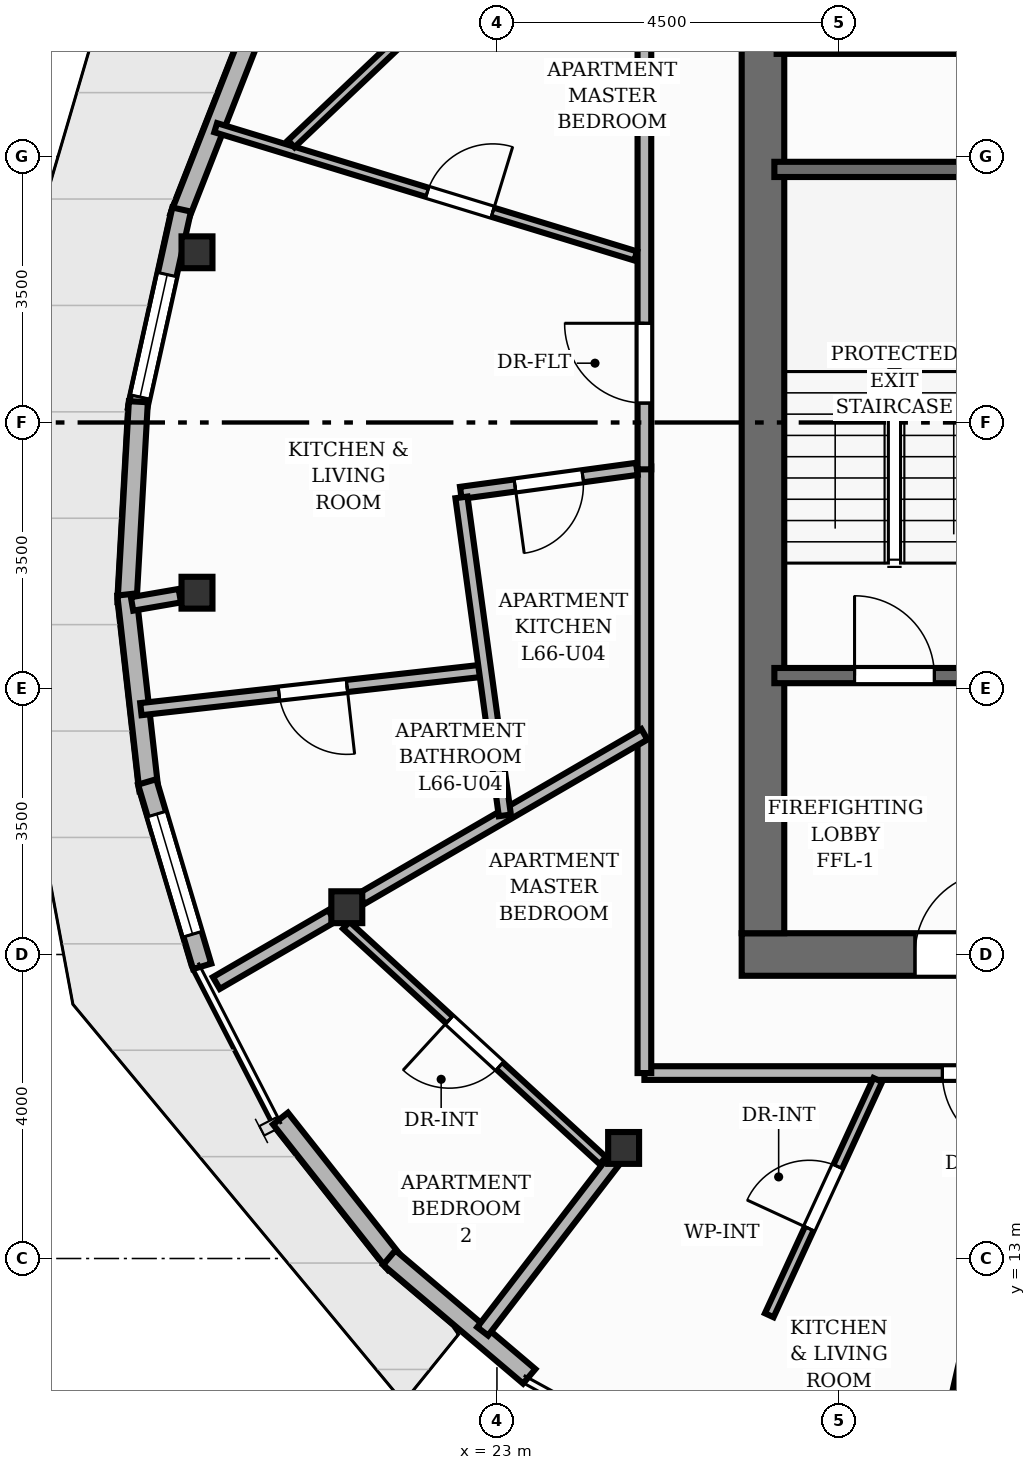
"""IFC4 building model, lengths in metres.
Left out: names, types, materials, properties, quantities, classifications, styles, units other than length and angle.
Written with IfcOpenShell. Run it as: python <this file> out.ifc"""

import sys

from ifc_helpers import new_model, si_unit, direction, frame, frame_2d, origin, origin_2d, place, context, subcontext, project, spatial, rectangle, i_section, extrude, element, fill, save


model = new_model("IFC4")
c1 = context("Model", 3, precision=1e-05, world=origin(), true_north=direction((0.0, 1.0)))
c2 = subcontext(c1, "Body", "Model", "MODEL_VIEW")
j1 = project(units=[si_unit("LENGTHUNIT", "METRE"), si_unit("PLANEANGLEUNIT", "RADIAN")], contexts=[c1])
p1 = place(None, origin())
s1 = spatial("IfcSite", under=j1, at=p1, CompositionType="ELEMENT")
p2 = place(p1, origin())
s2 = spatial("IfcBuilding", under=s1, at=p2, CompositionType="ELEMENT")
p3 = place(p2, frame((0.0, 0.0, 220.64)))
s3 = spatial("IfcBuildingStorey", under=s2, at=p3, CompositionType="ELEMENT", Elevation=220.64)
p4 = place(p3, frame((26.22, 17.0, 0.0), z_axis=(0.0, 0.0, 1.0), x_axis=(1.0, 0.0, 0.0)))
e1 = element("IfcWall", 1, at=p4, inside=s3, PredefinedType="SHEAR", context=c2, shape_type="SweptSolid", body=[
    extrude(rectangle(XDim=11.56, YDim=0.56, at=frame_2d((5.78, 0.0))), origin(), (0.0, 0.0, 1.0), 3.2),
])
p5 = place(p4, frame((2.28, 0.0, 0.0)))
e2 = element("IfcOpeningElement", 2, at=p5, cuts=e1, PredefinedType="OPENING", context=c2, shape_type="SweptSolid", body=[
    extrude(rectangle(XDim=1.1, YDim=2.15, at=frame_2d((0.55, 1.075))), frame((0.0, 0.29, 0.0), z_axis=(0.0, -1.0, 0.0), x_axis=(1.0, 0.0, 0.0)), (0.0, 0.0, 1.0), 0.58),
])
p6 = place(p4, frame((5.83, 0.0, 0.0)))
e3 = element("IfcOpeningElement", 3, at=p6, cuts=e1, PredefinedType="OPENING", context=c2, shape_type="SweptSolid", body=[
    extrude(rectangle(XDim=0.9, YDim=2.1, at=frame_2d((0.45, 1.05))), frame((0.0, 0.29, 0.0), z_axis=(0.0, -1.0, 0.0), x_axis=(1.0, 0.0, 0.0)), (0.0, 0.0, 1.0), 0.58),
])
p7 = place(p3, frame((26.5, 17.28, 0.0), z_axis=(0.0, 0.0, 1.0), x_axis=(0.0, 1.0, 0.0)))
e4 = element("IfcWall", 4, at=p7, inside=s3, PredefinedType="SHEAR", context=c2, shape_type="SweptSolid", body=[
    extrude(rectangle(XDim=13.44, YDim=0.56, at=frame_2d((6.72, 0.0))), origin(), (0.0, 0.0, 1.0), 3.2),
])
for number, where, z_axis, x_axis in (
    (5, (19.054, 26.24, 0.0), (0.0, 0.0, 1.0), (1.0, 0.0, 0.0)),
    (6, (19.054, 21.76, 0.0), (0.0, 0.0, 1.0), (1.0, 0.0, 0.0)),
    (7, (21.025, 17.622, 0.0), (0.0, 0.0, 1.0), (1.0, 0.0, 0.0)),
    (8, (24.667, 14.455, 0.0), (0.0, 0.0, 1.0), (1.0, 0.0, 0.0)),
):
    element("IfcColumn", number, at=place(p3, frame(where, z_axis=z_axis, x_axis=x_axis)), inside=s3, PredefinedType="COLUMN", context=c2, shape_type="SweptSolid", body=[
        extrude(i_section(OverallWidth=0.407, OverallDepth=0.419, WebThickness=0.031, FlangeThickness=0.049, at=origin_2d()), origin(), (0.0, 0.0, 1.0), 3.2),
    ])
p8 = place(p3, frame((18.82, 26.698, 0.0), z_axis=(0.0, 0.0, 1.0), x_axis=(0.365588934877, 0.930776412838, 0.0)))
e9 = element("IfcWall", 9, at=p8, inside=s3, PredefinedType="SOLIDWALL", context=c2, shape_type="SweptSolid", body=[
    extrude(rectangle(XDim=2.739, YDim=0.25, at=frame_2d((1.369, 0.0))), origin(), (0.0, 0.0, 1.0), 2.577),
])
p9 = place(p3, frame((18.267, 24.164, 0.0), z_axis=(0.0, 0.0, 1.0), x_axis=(0.21633718885, 0.976318708579, 0.0)))
e10 = element("IfcWall", 10, at=p9, inside=s3, PredefinedType="SOLIDWALL", context=c2, shape_type="SweptSolid", body=[
    extrude(rectangle(XDim=2.702, YDim=0.25, at=frame_2d((1.351, 0.0))), origin(), (0.0, 0.0, 1.0), 2.577),
])
p10 = place(p9, frame((0.175, 0.0, 0.85)))
e11 = element("IfcOpeningElement", 11, at=p10, cuts=e10, PredefinedType="OPENING", context=c2, shape_type="SweptSolid", body=[
    extrude(rectangle(XDim=1.65, YDim=1.55, at=frame_2d((0.825, 0.775))), frame((0.0, 0.135, 0.0), z_axis=(0.0, -1.0, 0.0), x_axis=(1.0, 0.0, 0.0)), (0.0, 0.0, 1.0), 0.27),
])
p11 = place(p3, frame((18.133, 21.626, 0.0), z_axis=(0.0, 0.0, 1.0), x_axis=(0.056270814174, 0.998415542483, 0.0)))
e12 = element("IfcWall", 12, at=p11, inside=s3, PredefinedType="SOLIDWALL", context=c2, shape_type="SweptSolid", body=[
    extrude(rectangle(XDim=2.651, YDim=0.25, at=frame_2d((1.325, 0.0))), origin(), (0.0, 0.0, 1.0), 2.96),
])
p12 = place(p3, frame((18.421, 19.161, 0.0), z_axis=(0.0, 0.0, 1.0), x_axis=(-0.112260931198, 0.993678762642, 0.0)))
e13 = element("IfcWall", 13, at=p12, inside=s3, PredefinedType="SOLIDWALL", context=c2, shape_type="SweptSolid", body=[
    extrude(rectangle(XDim=2.592, YDim=0.25, at=frame_2d((1.296, 0.0))), origin(), (0.0, 0.0, 1.0), 2.96),
])
p13 = place(p3, frame((19.122, 16.844, 0.0), z_axis=(0.0, 0.0, 1.0), x_axis=(-0.285604720301, 0.958347506775, 0.0)))
e14 = element("IfcWall", 14, at=p13, inside=s3, PredefinedType="SOLIDWALL", context=c2, shape_type="SweptSolid", body=[
    extrude(rectangle(XDim=2.532, YDim=0.25, at=frame_2d((1.266, 0.0))), origin(), (0.0, 0.0, 1.0), 2.96),
])
p14 = place(p13, frame((0.441, 0.0, 0.85)))
e15 = element("IfcOpeningElement", 15, at=p14, cuts=e14, PredefinedType="OPENING", context=c2, shape_type="SweptSolid", body=[
    extrude(rectangle(XDim=1.65, YDim=1.55, at=frame_2d((0.825, 0.775))), frame((0.0, 0.135, 0.0), z_axis=(0.0, -1.0, 0.0), x_axis=(1.0, 0.0, 0.0)), (0.0, 0.0, 1.0), 0.27),
])
p15 = place(p3, frame((21.663, 12.929, 0.0), z_axis=(0.0, 0.0, 1.0), x_axis=(-0.619881401672, 0.784695512833, 0.0)))
e16 = element("IfcWall", 16, at=p15, inside=s3, PredefinedType="SOLIDWALL", context=c2, shape_type="SweptSolid", body=[
    extrude(rectangle(XDim=2.437, YDim=0.25, at=frame_2d((1.218, 0.0))), origin(), (0.0, 0.0, 1.0), 2.96),
])
p16 = place(p3, frame((23.425, 11.45, 0.0), z_axis=(0.0, 0.0, 1.0), x_axis=(-0.762614923672, 0.646852748462, 0.0)))
e17 = element("IfcWall", 17, at=p16, inside=s3, PredefinedType="SOLIDWALL", context=c2, shape_type="SweptSolid", body=[
    extrude(rectangle(XDim=2.415, YDim=0.25, at=frame_2d((1.208, 0.0))), origin(), (0.0, 0.0, 1.0), 2.96),
])
p17 = place(p3, frame((26.65, 27.33, 0.0), z_axis=(0.0, 0.0, 1.0), x_axis=(1.0, 0.0, 0.0)))
e18 = element("IfcWall", 18, at=p17, inside=s3, PredefinedType="SHEAR", context=c2, shape_type="SweptSolid", body=[
    extrude(rectangle(XDim=3.24, YDim=0.2, at=frame_2d((1.62, 0.0))), origin(), (0.0, 0.0, 1.0), 3.2),
])
p18 = place(p3, frame((26.65, 20.67, 0.0), z_axis=(0.0, 0.0, 1.0), x_axis=(1.0, 0.0, 0.0)))
e19 = element("IfcWall", 19, at=p18, inside=s3, PredefinedType="SHEAR", context=c2, shape_type="SweptSolid", body=[
    extrude(rectangle(XDim=3.24, YDim=0.2, at=frame_2d((1.62, 0.0))), origin(), (0.0, 0.0, 1.0), 3.2),
])
p19 = place(p18, frame((1.055, 0.0, 0.0)))
e20 = element("IfcOpeningElement", 20, at=p19, cuts=e19, PredefinedType="OPENING", context=c2, shape_type="SweptSolid", body=[
    extrude(rectangle(XDim=1.05, YDim=2.15, at=frame_2d((0.525, 1.075))), frame((0.0, 0.11, 0.0), z_axis=(0.0, -1.0, 0.0), x_axis=(1.0, 0.0, 0.0)), (0.0, 0.0, 1.0), 0.22),
])
p20 = place(p3, frame((26.68, 28.95, 0.0), z_axis=(0.0, 0.0, 1.0), x_axis=(1.0, 0.0, 0.0)))
e21 = element("IfcWall", 21, at=p20, inside=s3, PredefinedType="SHEAR", context=c2, shape_type="SweptSolid", body=[
    extrude(rectangle(XDim=5.24, YDim=0.2, at=frame_2d((2.62, 0.0))), origin(), (0.0, 0.0, 1.0), 3.2),
])
p21 = place(p3, frame((18.827, 21.721, 0.0), z_axis=(0.0, 0.0, 1.0), x_axis=(-0.985371537423, -0.170419873359, 0.0)))
e22 = element("IfcWall", 22, at=p21, inside=s3, PredefinedType="PARTITIONING", context=c2, shape_type="SweptSolid", body=[
    extrude(rectangle(XDim=0.637, YDim=0.18, at=frame_2d((0.319, 0.0))), origin(), (0.0, 0.0, 1.0), 2.404),
])
p22 = place(p3, frame((20.826, 17.507, 0.0), z_axis=(0.0, 0.0, 1.0), x_axis=(-0.864599922959, -0.502460917106, 0.0)))
e23 = element("IfcWall", 23, at=p22, inside=s3, PredefinedType="PARTITIONING", context=c2, shape_type="SweptSolid", body=[
    extrude(rectangle(XDim=1.756, YDim=0.18, at=frame_2d((0.878, 0.0))), origin(), (0.0, 0.0, 1.0), 2.404),
])
p23 = place(p3, frame((24.527, 14.273, 0.0), z_axis=(0.0, 0.0, 1.0), x_axis=(-0.609232660573, -0.792991529142, 0.0)))
e24 = element("IfcWall", 24, at=p23, inside=s3, PredefinedType="PARTITIONING", context=c2, shape_type="SweptSolid", body=[
    extrude(rectangle(XDim=2.814, YDim=0.18, at=frame_2d((1.407, 0.0))), origin(), (0.0, 0.0, 1.0), 2.404),
])
p24 = place(p3, frame((29.374, 12.517, 0.0), z_axis=(0.0, 0.0, 1.0), x_axis=(-0.22291168124, -0.974838644272, 0.0)))
e25 = element("IfcWall", 25, at=p24, inside=s3, PredefinedType="PARTITIONING", context=c2, shape_type="SweptSolid", body=[
    extrude(rectangle(XDim=2.976, YDim=0.18, at=frame_2d((1.488, 0.0))), origin(), (0.0, 0.0, 1.0), 2.404),
])
p25 = place(p3, frame((30.74, 15.44, 0.0), z_axis=(0.0, 0.0, 1.0), x_axis=(-1.0, 0.0, 0.0)))
e26 = element("IfcWall", 26, at=p25, inside=s3, PredefinedType="PARTITIONING", context=c2, shape_type="SweptSolid", body=[
    extrude(rectangle(XDim=5.8, YDim=0.18, at=frame_2d((2.9, 0.0))), origin(), (0.0, 0.0, 1.0), 2.955),
])
p26 = place(p25, frame((0.83, 0.0, 0.0)))
e27 = element("IfcOpeningElement", 27, at=p26, cuts=e26, PredefinedType="OPENING", context=c2, shape_type="SweptSolid", body=[
    extrude(rectangle(XDim=1.05, YDim=2.15, at=frame_2d((0.525, 1.075))), frame((0.0, 0.1, 0.0), z_axis=(0.0, -1.0, 0.0), x_axis=(1.0, 0.0, 0.0)), (0.0, 0.0, 1.0), 0.2),
])
p27 = place(p3, frame((24.94, 15.44, 0.0), z_axis=(0.0, 0.0, 1.0), x_axis=(0.0, 1.0, 0.0)))
e28 = element("IfcWall", 28, at=p27, inside=s3, PredefinedType="PARTITIONING", context=c2, shape_type="SweptSolid", body=[
    extrude(rectangle(XDim=7.982, YDim=0.18, at=frame_2d((3.991, 0.0))), origin(), (0.0, 0.0, 1.0), 2.955),
])
p28 = place(p3, frame((24.94, 23.384, 0.0), z_axis=(0.0, 0.0, 1.0), x_axis=(0.0, 1.0, 0.0)))
e29 = element("IfcWall", 29, at=p28, inside=s3, PredefinedType="PARTITIONING", context=c2, shape_type="SweptSolid", body=[
    extrude(rectangle(XDim=9.177, YDim=0.18, at=frame_2d((4.588, 0.0))), origin(), (0.0, 0.0, 1.0), 2.955),
])
p29 = place(p28, frame((0.872, 0.0, 0.0)))
e30 = element("IfcOpeningElement", 30, at=p29, cuts=e29, PredefinedType="OPENING", context=c2, shape_type="SweptSolid", body=[
    extrude(rectangle(XDim=1.05, YDim=2.15, at=frame_2d((0.525, 1.075))), frame((0.0, 0.1, 0.0), z_axis=(0.0, -1.0, 0.0), x_axis=(1.0, 0.0, 0.0)), (0.0, 0.0, 1.0), 0.2),
])
p30 = place(p3, frame((26.583, 12.253, 0.0), z_axis=(0.0, 0.0, 1.0), x_axis=(0.41880384085, 0.908076727424, 0.0)))
e31 = element("IfcWall", 31, at=p30, inside=s3, PredefinedType="PARTITIONING", context=c2, shape_type="SweptSolid", body=[
    extrude(rectangle(XDim=3.409, YDim=0.125, at=frame_2d((1.705, 0.0))), origin(), (0.0, 0.0, 1.0), 2.955),
])
p31 = place(p30, frame((1.255, 0.0, 0.0)))
e32 = element("IfcOpeningElement", 32, at=p31, cuts=e31, PredefinedType="OPENING", context=c2, shape_type="SweptSolid", body=[
    extrude(rectangle(XDim=0.9, YDim=2.1, at=frame_2d((0.45, 1.05))), frame((0.0, 0.073, 0.0), z_axis=(0.0, -1.0, 0.0), x_axis=(1.0, 0.0, 0.0)), (0.0, 0.0, 1.0), 0.145),
])
p32 = place(p3, frame((24.393, 14.288, 0.0), z_axis=(0.0, 0.0, 1.0), x_axis=(-0.736828890574, 0.676079274949, 0.0)))
e33 = element("IfcWall", 33, at=p32, inside=s3, PredefinedType="PARTITIONING", context=c2, shape_type="SweptSolid", body=[
    extrude(rectangle(XDim=4.582, YDim=0.125, at=frame_2d((2.291, 0.0))), origin(), (0.0, 0.0, 1.0), 2.488),
])
p33 = place(p32, frame((1.841, 0.0, 0.0)))
e34 = element("IfcOpeningElement", 34, at=p33, cuts=e33, PredefinedType="OPENING", context=c2, shape_type="SweptSolid", body=[
    extrude(rectangle(XDim=0.9, YDim=2.1, at=frame_2d((0.45, 1.05))), frame((0.0, 0.073, 0.0), z_axis=(0.0, -1.0, 0.0), x_axis=(1.0, 0.0, 0.0)), (0.0, 0.0, 1.0), 0.145),
])
p34 = place(p3, frame((21.218, 17.734, 0.0), z_axis=(0.0, 0.0, 1.0), x_axis=(0.864618907014, 0.502428249239, 0.0)))
e35 = element("IfcWall", 35, at=p34, inside=s3, PredefinedType="PLUMBINGWALL", context=c2, shape_type="SweptSolid", body=[
    extrude(rectangle(XDim=4.305, YDim=0.16, at=frame_2d((2.153, 0.0))), origin(), (0.0, 0.0, 1.0), 2.404),
])
p35 = place(p3, frame((22.844, 20.738, 0.0), z_axis=(0.0, 0.0, 1.0), x_axis=(-0.993735184374, -0.111760383578, 0.0)))
e36 = element("IfcWall", 36, at=p35, inside=s3, PredefinedType="PLUMBINGWALL", context=c2, shape_type="SweptSolid", body=[
    extrude(rectangle(XDim=4.557, YDim=0.16, at=frame_2d((2.278, 0.0))), origin(), (0.0, 0.0, 1.0), 2.692),
])
p36 = place(p35, frame((1.829, 0.0, 0.0)))
e37 = element("IfcOpeningElement", 37, at=p36, cuts=e36, PredefinedType="OPENING", context=c2, shape_type="SweptSolid", body=[
    extrude(rectangle(XDim=0.9, YDim=2.1, at=frame_2d((0.45, 1.05))), frame((0.0, 0.09, 0.0), z_axis=(0.0, -1.0, 0.0), x_axis=(1.0, 0.0, 0.0)), (0.0, 0.0, 1.0), 0.18),
])
p37 = place(p3, frame((19.3, 27.879, 0.0), z_axis=(0.0, 0.0, 1.0), x_axis=(0.956379122361, -0.29212835246, 0.0)))
e38 = element("IfcWall", 38, at=p37, inside=s3, PredefinedType="PARTITIONING", context=c2, shape_type="SweptSolid", body=[
    extrude(rectangle(XDim=5.777, YDim=0.125, at=frame_2d((2.889, 0.0))), origin(), (0.0, 0.0, 1.0), 2.692),
])
p38 = place(p37, frame((2.91, 0.0, 0.0)))
e39 = element("IfcOpeningElement", 39, at=p38, cuts=e38, PredefinedType="OPENING", context=c2, shape_type="SweptSolid", body=[
    extrude(rectangle(XDim=0.9, YDim=2.1, at=frame_2d((0.45, 1.05))), frame((0.0, 0.073, 0.0), z_axis=(0.0, -1.0, 0.0), x_axis=(1.0, 0.0, 0.0)), (0.0, 0.0, 1.0), 0.145),
])
p39 = place(p3, frame((24.841, 23.39, 0.0), z_axis=(0.0, 0.0, 1.0), x_axis=(-0.990823810893, -0.135159815654, 0.0)))
e40 = element("IfcWall", 40, at=p39, inside=s3, PredefinedType="PLUMBINGWALL", context=c2, shape_type="SweptSolid", body=[
    extrude(rectangle(XDim=2.337, YDim=0.16, at=frame_2d((1.169, 0.0))), origin(), (0.0, 0.0, 1.0), 2.692),
])
p40 = place(p39, frame((0.719, 0.0, 0.0)))
e41 = element("IfcOpeningElement", 41, at=p40, cuts=e40, PredefinedType="OPENING", context=c2, shape_type="SweptSolid", body=[
    extrude(rectangle(XDim=0.9, YDim=2.1, at=frame_2d((0.45, 1.05))), frame((0.0, 0.09, 0.0), z_axis=(0.0, -1.0, 0.0), x_axis=(1.0, 0.0, 0.0)), (0.0, 0.0, 1.0), 0.18),
])
p41 = place(p3, frame((22.533, 23.015, 0.0), z_axis=(0.0, 0.0, 1.0), x_axis=(0.135218975067, -0.990815739066, 0.0)))
e42 = element("IfcWall", 42, at=p41, inside=s3, PredefinedType="PLUMBINGWALL", context=c2, shape_type="SweptSolid", body=[
    extrude(rectangle(XDim=4.223, YDim=0.16, at=frame_2d((2.112, 0.0))), origin(), (0.0, 0.0, 1.0), 2.955),
])
p42 = place(p3, frame((20.293, 27.667, 0.0), z_axis=(0.0, 0.0, 1.0), x_axis=(0.725799476315, 0.687906330965, 0.0)))
e43 = element("IfcWall", 43, at=p42, inside=s3, PredefinedType="PARTITIONING", context=c2, shape_type="SweptSolid", body=[
    extrude(rectangle(XDim=6.282, YDim=0.125, at=frame_2d((3.141, 0.0))), origin(), (0.0, 0.0, 1.0), 2.955),
])
p43 = place(p42, frame((2.691, 0.0, 0.0)))
e44 = element("IfcOpeningElement", 44, at=p43, cuts=e43, PredefinedType="OPENING", context=c2, shape_type="SweptSolid", body=[
    extrude(rectangle(XDim=0.9, YDim=2.1, at=frame_2d((0.45, 1.05))), frame((0.0, 0.073, 0.0), z_axis=(0.0, -1.0, 0.0), x_axis=(1.0, 0.0, 0.0)), (0.0, 0.0, 1.0), 0.145),
])
p44 = place(p10, origin())
e45 = element("IfcWindow", 45, at=p44, inside=s3, PartitioningType="SINGLE_PANEL", PredefinedType="WINDOW", context=c2, shape_type="SweptSolid", body=[
    extrude(rectangle(XDim=1.65, YDim=1.55, at=frame_2d((0.825, 0.775))), frame((0.0, 0.03, 0.0), z_axis=(0.0, -1.0, 0.0), x_axis=(1.0, 0.0, 0.0)), (0.0, 0.0, 1.0), 0.06),
])
fill(e11, e45)
p45 = place(p14, origin())
e46 = element("IfcWindow", 46, at=p45, inside=s3, PartitioningType="SINGLE_PANEL", PredefinedType="WINDOW", context=c2, shape_type="SweptSolid", body=[
    extrude(rectangle(XDim=1.65, YDim=1.55, at=frame_2d((0.825, 0.775))), frame((0.0, 0.03, 0.0), z_axis=(0.0, -1.0, 0.0), x_axis=(1.0, 0.0, 0.0)), (0.0, 0.0, 1.0), 0.06),
])
fill(e15, e46)
p46 = place(p19, origin())
e47 = element("IfcDoor", 47, at=p46, inside=s3, OperationType="SINGLE_SWING_LEFT", PredefinedType="DOOR", context=c2, shape_type="SweptSolid", body=[
    extrude(rectangle(XDim=1.05, YDim=2.15, at=frame_2d((0.525, 1.075))), frame((0.0, 0.025, 0.0), z_axis=(0.0, -1.0, 0.0), x_axis=(1.0, 0.0, 0.0)), (0.0, 0.0, 1.0), 0.05),
])
fill(e20, e47)
p47 = place(p5, origin())
e48 = element("IfcDoor", 48, at=p47, inside=s3, OperationType="SINGLE_SWING_RIGHT", PredefinedType="DOOR", context=c2, shape_type="SweptSolid", body=[
    extrude(rectangle(XDim=1.1, YDim=2.15, at=frame_2d((0.55, 1.075))), frame((0.0, 0.025, 0.0), z_axis=(0.0, -1.0, 0.0), x_axis=(1.0, 0.0, 0.0)), (0.0, 0.0, 1.0), 0.05),
])
fill(e2, e48)
p48 = place(p26, origin())
e49 = element("IfcDoor", 49, at=p48, inside=s3, OperationType="SINGLE_SWING_LEFT", PredefinedType="DOOR", context=c2, shape_type="SweptSolid", body=[
    extrude(rectangle(XDim=1.05, YDim=2.15, at=frame_2d((0.525, 1.075))), frame((0.0, 0.025, 0.0), z_axis=(0.0, -1.0, 0.0), x_axis=(1.0, 0.0, 0.0)), (0.0, 0.0, 1.0), 0.05),
])
fill(e27, e49)
p49 = place(p31, origin())
e50 = element("IfcDoor", 50, at=p49, inside=s3, OperationType="SINGLE_SWING_LEFT", PredefinedType="DOOR", context=c2, shape_type="SweptSolid", body=[
    extrude(rectangle(XDim=0.9, YDim=2.1, at=frame_2d((0.45, 1.05))), frame((0.0, 0.025, 0.0), z_axis=(0.0, -1.0, 0.0), x_axis=(1.0, 0.0, 0.0)), (0.0, 0.0, 1.0), 0.05),
])
fill(e32, e50)
p50 = place(p33, origin())
e51 = element("IfcDoor", 51, at=p50, inside=s3, OperationType="SINGLE_SWING_RIGHT", PredefinedType="DOOR", context=c2, shape_type="SweptSolid", body=[
    extrude(rectangle(XDim=0.9, YDim=2.1, at=frame_2d((0.45, 1.05))), frame((0.0, 0.025, 0.0), z_axis=(0.0, -1.0, 0.0), x_axis=(1.0, 0.0, 0.0)), (0.0, 0.0, 1.0), 0.05),
])
fill(e34, e51)
p51 = place(p29, origin())
e52 = element("IfcDoor", 52, at=p51, inside=s3, OperationType="SINGLE_SWING_RIGHT", PredefinedType="DOOR", context=c2, shape_type="SweptSolid", body=[
    extrude(rectangle(XDim=1.05, YDim=2.15, at=frame_2d((0.525, 1.075))), frame((0.0, 0.025, 0.0), z_axis=(0.0, -1.0, 0.0), x_axis=(1.0, 0.0, 0.0)), (0.0, 0.0, 1.0), 0.05),
])
fill(e30, e52)
p52 = place(p36, origin())
e53 = element("IfcDoor", 53, at=p52, inside=s3, OperationType="SINGLE_SWING_LEFT", PredefinedType="DOOR", context=c2, shape_type="SweptSolid", body=[
    extrude(rectangle(XDim=0.9, YDim=2.1, at=frame_2d((0.45, 1.05))), frame((0.0, 0.025, 0.0), z_axis=(0.0, -1.0, 0.0), x_axis=(1.0, 0.0, 0.0)), (0.0, 0.0, 1.0), 0.05),
])
fill(e37, e53)
p53 = place(p38, origin())
e54 = element("IfcDoor", 54, at=p53, inside=s3, OperationType="SINGLE_SWING_RIGHT", PredefinedType="DOOR", context=c2, shape_type="SweptSolid", body=[
    extrude(rectangle(XDim=0.9, YDim=2.1, at=frame_2d((0.45, 1.05))), frame((0.0, 0.025, 0.0), z_axis=(0.0, -1.0, 0.0), x_axis=(1.0, 0.0, 0.0)), (0.0, 0.0, 1.0), 0.05),
])
fill(e39, e54)
p54 = place(p40, origin())
e55 = element("IfcDoor", 55, at=p54, inside=s3, OperationType="SINGLE_SWING_RIGHT", PredefinedType="DOOR", context=c2, shape_type="SweptSolid", body=[
    extrude(rectangle(XDim=0.9, YDim=2.1, at=frame_2d((0.45, 1.05))), frame((0.0, 0.025, 0.0), z_axis=(0.0, -1.0, 0.0), x_axis=(1.0, 0.0, 0.0)), (0.0, 0.0, 1.0), 0.05),
])
fill(e41, e55)
save(model, sys.argv[1])
